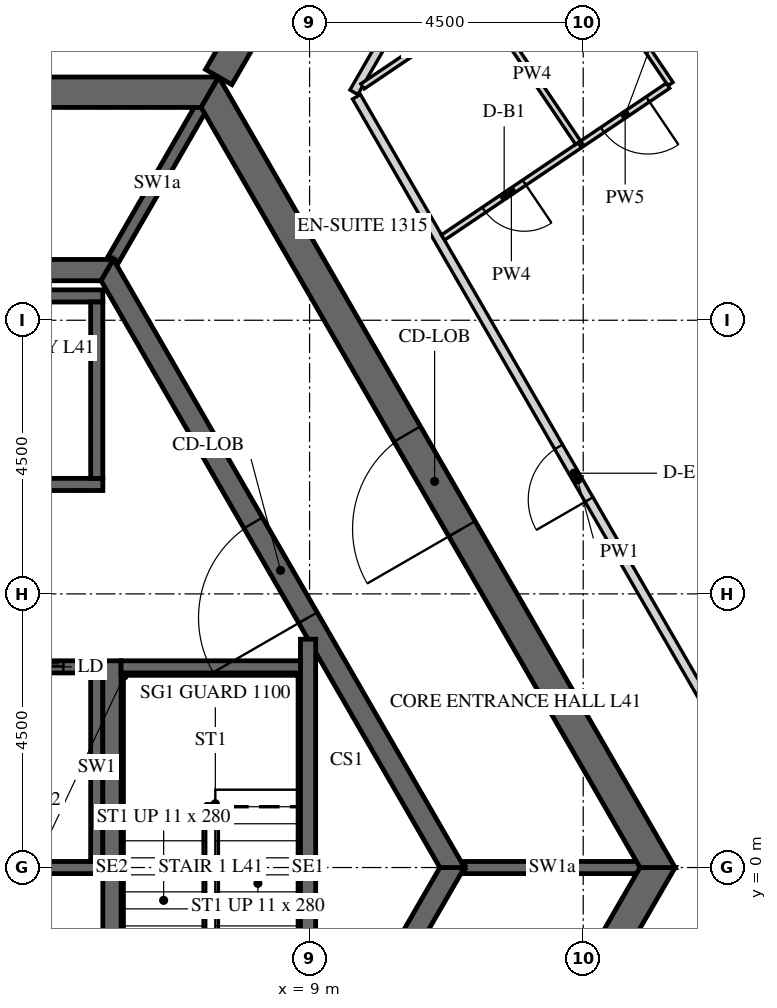
"""IFC4 building model, lengths in metres.
Left out: names, types, materials, properties, quantities, classifications, styles, units other than length and angle.
Written with IfcOpenShell. Run it as: python <this file> out.ifc"""

import sys

from ifc_helpers import new_model, si_unit, direction, frame, frame_2d, origin, place, context, subcontext, project, spatial, polyline, rectangle, outline, extrude, element, fill, save


model = new_model("IFC4")
c1 = context("Model", 3, precision=1e-05, world=origin(), true_north=direction((0.0, 1.0)))
c2 = subcontext(c1, "Body", "Model", "MODEL_VIEW")
j1 = project(units=[si_unit("LENGTHUNIT", "METRE"), si_unit("PLANEANGLEUNIT", "RADIAN")], contexts=[c1])
p1 = place(None, origin())
s1 = spatial("IfcSite", under=j1, at=p1, CompositionType="ELEMENT")
p2 = place(p1, origin())
s2 = spatial("IfcBuilding", under=s1, at=p2, CompositionType="ELEMENT")
p3 = place(p2, frame((0.0, 0.0, 176.1)))
s3 = spatial("IfcBuildingStorey", under=s2, at=p3, CompositionType="ELEMENT", Elevation=176.1)
p4 = place(p3, frame((7.361, -12.75, -0.15), z_axis=(0.0, 0.0, 1.0), x_axis=(0.50000571537, 0.866022103989, 0.0)))
e1 = element("IfcWall", 1, at=p4, inside=s3, PredefinedType="SHEAR", context=c2, shape_type="SweptSolid", body=[
    extrude(outline(polyline([(-0.144, -0.25), (14.867, -0.25), (14.578, 0.25), (0.144, 0.25), (-0.144, -0.25)])), origin(), (0.0, 0.0, 1.0), 3.9),
])
p5 = place(p4, frame((6.49, 0.0, 0.15)))
e2 = element("IfcOpeningElement", 2, at=p5, cuts=e1, PredefinedType="OPENING", context=c2, shape_type="SweptSolid", body=[
    extrude(rectangle(XDim=1.8, YDim=2.4, at=frame_2d((0.9, 1.2))), frame((0.0, 0.26, 0.0), z_axis=(0.0, -1.0, 0.0), x_axis=(1.0, 0.0, 0.0)), (0.0, 0.0, 1.0), 0.52),
])
p6 = place(p3, frame((14.722, 0.0, -0.15), z_axis=(0.0, 0.0, 1.0), x_axis=(-0.50000571537, 0.866022103989, 0.0)))
e3 = element("IfcWall", 3, at=p6, inside=s3, PredefinedType="SHEAR", context=c2, shape_type="SweptSolid", body=[
    extrude(outline(polyline([(-0.144, -0.25), (14.867, -0.25), (14.578, 0.25), (0.144, 0.25), (-0.144, -0.25)])), origin(), (0.0, 0.0, 1.0), 3.9),
])
p7 = place(p6, frame((6.432, 0.0, 0.15)))
e4 = element("IfcOpeningElement", 4, at=p7, cuts=e3, PredefinedType="OPENING", context=c2, shape_type="SweptSolid", body=[
    extrude(rectangle(XDim=1.8, YDim=2.4, at=frame_2d((0.9, 1.2))), frame((0.0, 0.26, 0.0), z_axis=(0.0, -1.0, 0.0), x_axis=(1.0, 0.0, 0.0)), (0.0, 0.0, 1.0), 0.52),
])
p8 = place(p3, frame((7.361, 12.75, -0.15), z_axis=(0.0, 0.0, 1.0), x_axis=(-1.0, 0.0, 0.0)))
e5 = element("IfcWall", 5, at=p8, inside=s3, PredefinedType="SHEAR", context=c2, shape_type="SweptSolid", body=[
    extrude(outline(polyline([(-0.144, -0.25), (14.866, -0.25), (14.578, 0.25), (0.144, 0.25), (-0.144, -0.25)])), origin(), (0.0, 0.0, 1.0), 3.9),
])
p9 = place(p8, frame((6.761, 0.0, 0.15)))
e6 = element("IfcOpeningElement", 6, at=p9, cuts=e5, PredefinedType="OPENING", context=c2, shape_type="SweptSolid", body=[
    extrude(rectangle(XDim=1.2, YDim=2.4, at=frame_2d((0.6, 1.2))), frame((0.0, 0.26, 0.0), z_axis=(0.0, -1.0, 0.0), x_axis=(1.0, 0.0, 0.0)), (0.0, 0.0, 1.0), 0.52),
])
p10 = place(p3, frame((7.506, 13.0, -0.15), z_axis=(0.0, 0.0, 1.0), x_axis=(0.499988271576, 0.866032175087, 0.0)))
e7 = element("IfcWall", 7, at=p10, inside=s3, PredefinedType="SHEAR", context=c2, shape_type="SweptSolid", body=[
    extrude(rectangle(XDim=15.424, YDim=0.5, at=frame_2d((7.712, 0.0))), origin(), (0.0, 0.0, 1.0), 3.9),
])
p11 = place(p10, frame((6.812, 0.0, 0.15)))
e8 = element("IfcOpeningElement", 8, at=p11, cuts=e7, PredefinedType="OPENING", context=c2, shape_type="SweptSolid", body=[
    extrude(rectangle(XDim=1.8, YDim=2.4, at=frame_2d((0.9, 1.2))), frame((0.0, 0.26, 0.0), z_axis=(0.0, -1.0, 0.0), x_axis=(1.0, 0.0, 0.0)), (0.0, 0.0, 1.0), 0.52),
])
p12 = place(p3, frame((5.673, -9.825, -0.15), z_axis=(0.0, 0.0, 1.0), x_axis=(0.499995046907, 0.866028263435, 0.0)))
e9 = element("IfcWall", 9, at=p12, inside=s3, PredefinedType="SHEAR", context=c2, shape_type="SweptSolid", body=[
    extrude(outline(polyline([(-0.101, -0.175), (11.446, -0.175), (11.244, 0.175), (0.101, 0.175), (-0.101, -0.175)])), origin(), (0.0, 0.0, 1.0), 3.9),
])
p13 = place(p12, frame((4.801, 0.0, 0.15)))
e10 = element("IfcOpeningElement", 10, at=p13, cuts=e9, PredefinedType="OPENING", context=c2, shape_type="SweptSolid", body=[
    extrude(rectangle(XDim=1.8, YDim=2.4, at=frame_2d((0.9, 1.2))), frame((0.0, 0.185, 0.0), z_axis=(0.0, -1.0, 0.0), x_axis=(1.0, 0.0, 0.0)), (0.0, 0.0, 1.0), 0.37),
])
p14 = place(p3, frame((11.345, 0.0, -0.15), z_axis=(0.0, 0.0, 1.0), x_axis=(-0.499995046907, 0.866028263435, 0.0)))
e11 = element("IfcWall", 11, at=p14, inside=s3, PredefinedType="SHEAR", context=c2, shape_type="SweptSolid", body=[
    extrude(outline(polyline([(-0.101, -0.175), (11.446, -0.175), (11.244, 0.175), (0.101, 0.175), (-0.101, -0.175)])), origin(), (0.0, 0.0, 1.0), 3.9),
])
p15 = place(p14, frame((4.744, 0.0, 0.15)))
e12 = element("IfcOpeningElement", 12, at=p15, cuts=e11, PredefinedType="OPENING", context=c2, shape_type="SweptSolid", body=[
    extrude(rectangle(XDim=1.8, YDim=2.4, at=frame_2d((0.9, 1.2))), frame((0.0, 0.185, 0.0), z_axis=(0.0, -1.0, 0.0), x_axis=(1.0, 0.0, 0.0)), (0.0, 0.0, 1.0), 0.37),
])
p16 = place(p3, frame((5.673, 9.825, -0.15), z_axis=(0.0, 0.0, 1.0), x_axis=(-1.0, 0.0, 0.0)))
e13 = element("IfcWall", 13, at=p16, inside=s3, PredefinedType="SHEAR", context=c2, shape_type="SweptSolid", body=[
    extrude(outline(polyline([(-0.101, -0.175), (11.446, -0.175), (11.244, 0.175), (0.101, 0.175), (-0.101, -0.175)])), origin(), (0.0, 0.0, 1.0), 3.9),
])
p17 = place(p3, frame((-5.6, 6.3, -0.25), z_axis=(0.0, 0.0, 1.0), x_axis=(1.0, 0.0, 0.0)))
e14 = element("IfcWall", 14, at=p17, inside=s3, PredefinedType="SHEAR", context=c2, shape_type="SweptSolid", body=[
    extrude(rectangle(XDim=11.2, YDim=0.2, at=frame_2d((5.6, 0.0))), origin(), (0.0, 0.0, 1.0), 3.9),
])
p18 = place(p17, frame((8.45, 0.0, 0.25)))
e15 = element("IfcOpeningElement", 15, at=p18, cuts=e14, PredefinedType="OPENING", context=c2, shape_type="SweptSolid", body=[
    extrude(rectangle(XDim=0.9, YDim=2.1, at=frame_2d((0.45, 1.05))), frame((0.0, 0.11, 0.0), z_axis=(0.0, -1.0, 0.0), x_axis=(1.0, 0.0, 0.0)), (0.0, 0.0, 1.0), 0.22),
])
p19 = place(p17, frame((0.65, 0.0, 0.25)))
e16 = element("IfcOpeningElement", 16, at=p19, cuts=e14, PredefinedType="OPENING", context=c2, shape_type="SweptSolid", body=[
    extrude(rectangle(XDim=1.1, YDim=2.1, at=frame_2d((0.55, 1.05))), frame((0.0, 0.11, 0.0), z_axis=(0.0, -1.0, 0.0), x_axis=(1.0, 0.0, 0.0)), (0.0, 0.0, 1.0), 0.22),
])
p20 = place(p17, frame((2.85, 0.0, 0.25)))
e17 = element("IfcOpeningElement", 17, at=p20, cuts=e14, PredefinedType="OPENING", context=c2, shape_type="SweptSolid", body=[
    extrude(rectangle(XDim=1.1, YDim=2.1, at=frame_2d((0.55, 1.05))), frame((0.0, 0.11, 0.0), z_axis=(0.0, -1.0, 0.0), x_axis=(1.0, 0.0, 0.0)), (0.0, 0.0, 1.0), 0.22),
])
p21 = place(p17, frame((5.05, 0.0, 0.25)))
e18 = element("IfcOpeningElement", 18, at=p21, cuts=e14, PredefinedType="OPENING", context=c2, shape_type="SweptSolid", body=[
    extrude(rectangle(XDim=1.1, YDim=2.1, at=frame_2d((0.55, 1.05))), frame((0.0, 0.11, 0.0), z_axis=(0.0, -1.0, 0.0), x_axis=(1.0, 0.0, 0.0)), (0.0, 0.0, 1.0), 0.22),
])
p22 = place(p3, frame((-5.6, 9.4, -0.25), z_axis=(0.0, 0.0, 1.0), x_axis=(1.0, 0.0, 0.0)))
e19 = element("IfcWall", 19, at=p22, inside=s3, PredefinedType="SHEAR", context=c2, shape_type="SweptSolid", body=[
    extrude(rectangle(XDim=11.2, YDim=0.2, at=frame_2d((5.6, 0.0))), origin(), (0.0, 0.0, 1.0), 3.9),
])
p23 = place(p3, frame((5.5, 6.4, -0.25), z_axis=(0.0, 0.0, 1.0), x_axis=(0.0, 1.0, 0.0)))
e20 = element("IfcWall", 20, at=p23, inside=s3, PredefinedType="SHEAR", context=c2, shape_type="SweptSolid", body=[
    extrude(rectangle(XDim=2.9, YDim=0.2, at=frame_2d((1.45, 0.0))), origin(), (0.0, 0.0, 1.0), 3.9),
])
p24 = place(p3, frame((-5.6, 3.3, -0.25), z_axis=(0.0, 0.0, 1.0), x_axis=(1.0, 0.0, 0.0)))
e21 = element("IfcWall", 21, at=p24, inside=s3, PredefinedType="SHEAR", context=c2, shape_type="SweptSolid", body=[
    extrude(rectangle(XDim=11.2, YDim=0.2, at=frame_2d((5.6, 0.0))), origin(), (0.0, 0.0, 1.0), 3.9),
])
p25 = place(p24, frame((0.65, 0.0, 0.25)))
e22 = element("IfcOpeningElement", 22, at=p25, cuts=e21, PredefinedType="OPENING", context=c2, shape_type="SweptSolid", body=[
    extrude(rectangle(XDim=1.1, YDim=2.1, at=frame_2d((0.55, 1.05))), frame((0.0, 0.11, 0.0), z_axis=(0.0, -1.0, 0.0), x_axis=(1.0, 0.0, 0.0)), (0.0, 0.0, 1.0), 0.22),
])
p26 = place(p24, frame((2.85, 0.0, 0.25)))
e23 = element("IfcOpeningElement", 23, at=p26, cuts=e21, PredefinedType="OPENING", context=c2, shape_type="SweptSolid", body=[
    extrude(rectangle(XDim=1.1, YDim=2.1, at=frame_2d((0.55, 1.05))), frame((0.0, 0.11, 0.0), z_axis=(0.0, -1.0, 0.0), x_axis=(1.0, 0.0, 0.0)), (0.0, 0.0, 1.0), 0.22),
])
p27 = place(p24, frame((5.05, 0.0, 0.25)))
e24 = element("IfcOpeningElement", 24, at=p27, cuts=e21, PredefinedType="OPENING", context=c2, shape_type="SweptSolid", body=[
    extrude(rectangle(XDim=1.1, YDim=2.1, at=frame_2d((0.55, 1.05))), frame((0.0, 0.11, 0.0), z_axis=(0.0, -1.0, 0.0), x_axis=(1.0, 0.0, 0.0)), (0.0, 0.0, 1.0), 0.22),
])
p28 = place(p24, frame((7.25, 0.0, 0.25)))
e25 = element("IfcOpeningElement", 25, at=p28, cuts=e21, PredefinedType="OPENING", context=c2, shape_type="SweptSolid", body=[
    extrude(rectangle(XDim=1.1, YDim=2.1, at=frame_2d((0.55, 1.05))), frame((0.0, 0.11, 0.0), z_axis=(0.0, -1.0, 0.0), x_axis=(1.0, 0.0, 0.0)), (0.0, 0.0, 1.0), 0.22),
])
p29 = place(p24, frame((9.45, 0.0, 0.25)))
e26 = element("IfcOpeningElement", 26, at=p29, cuts=e21, PredefinedType="OPENING", context=c2, shape_type="SweptSolid", body=[
    extrude(rectangle(XDim=1.1, YDim=2.1, at=frame_2d((0.55, 1.05))), frame((0.0, 0.11, 0.0), z_axis=(0.0, -1.0, 0.0), x_axis=(1.0, 0.0, 0.0)), (0.0, 0.0, 1.0), 0.22),
])
p30 = place(p3, frame((-5.6, 0.0, -0.25), z_axis=(0.0, 0.0, 1.0), x_axis=(1.0, 0.0, 0.0)))
e27 = element("IfcWall", 27, at=p30, inside=s3, PredefinedType="SHEAR", context=c2, shape_type="SweptSolid", body=[
    extrude(rectangle(XDim=11.2, YDim=0.2, at=frame_2d((5.6, 0.0))), origin(), (0.0, 0.0, 1.0), 3.9),
])
p31 = place(p3, frame((5.5, 0.1, -0.25), z_axis=(0.0, 0.0, 1.0), x_axis=(0.0, 1.0, 0.0)))
e28 = element("IfcWall", 28, at=p31, inside=s3, PredefinedType="SHEAR", context=c2, shape_type="SweptSolid", body=[
    extrude(rectangle(XDim=3.1, YDim=0.2, at=frame_2d((1.55, 0.0))), origin(), (0.0, 0.0, 1.0), 3.9),
])
for number, where, z_axis, x_axis in (
    (29, (11.547, 0.0, -0.15), (0.0, 0.0, 1.0), (1.0, 0.0, 0.0)),
    (30, (5.773, 10.0, -0.15), (0.0, 0.0, 1.0), (0.5, 0.866, 0.0)),
):
    element("IfcWall", number, at=place(p3, frame(where, z_axis=z_axis, x_axis=x_axis)), inside=s3, PredefinedType="SHEAR", context=c2, shape_type="SweptSolid", body=[
        extrude(rectangle(XDim=2.887, YDim=0.2, at=frame_2d((1.443, 0.0))), origin(), (0.0, 0.0, 1.0), 3.9),
    ])
p32 = place(p3, frame((5.75, -3.4, -0.25), z_axis=(0.0, 0.0, 1.0), x_axis=(0.0, 1.0, 0.0)))
e31 = element("IfcWall", 31, at=p32, inside=s3, PredefinedType="SHEAR", context=c2, shape_type="SweptSolid", body=[
    extrude(rectangle(XDim=6.8, YDim=0.3, at=frame_2d((3.4, 0.0))), origin(), (0.0, 0.0, 1.0), 3.9),
])
p33 = place(p3, frame((8.975, -3.755, -0.25), z_axis=(0.0, 0.0, 1.0), x_axis=(0.0, 1.0, 0.0)))
e32 = element("IfcWall", 32, at=p33, inside=s3, PredefinedType="SHEAR", context=c2, shape_type="SweptSolid", body=[
    extrude(rectangle(XDim=7.51, YDim=0.25, at=frame_2d((3.755, 0.0))), origin(), (0.0, 0.0, 1.0), 3.9),
])
p34 = place(p3, frame((5.9, 3.3, -0.25), z_axis=(0.0, 0.0, 1.0), x_axis=(1.0, 0.0, 0.0)))
e33 = element("IfcWall", 33, at=p34, inside=s3, PredefinedType="SHEAR", context=c2, shape_type="SweptSolid", body=[
    extrude(rectangle(XDim=2.95, YDim=0.2, at=frame_2d((1.475, 0.0))), origin(), (0.0, 0.0, 1.0), 3.9),
])
p35 = place(p3, frame((10.714, -11.043, 0.0), z_axis=(0.0, 0.0, 1.0), x_axis=(0.500001980452, 0.866024260367, 0.0)))
e34 = element("IfcWall", 34, at=p35, inside=s3, PredefinedType="PARTITIONING", context=c2, shape_type="SweptSolid", body=[
    extrude(rectangle(XDim=12.752, YDim=0.15, at=frame_2d((6.376, 0.0))), origin(), (0.0, 0.0, 1.0), 2.988),
])
p36 = place(p35, frame((6.125, 0.0, 0.0)))
e35 = element("IfcOpeningElement", 35, at=p36, cuts=e34, PredefinedType="OPENING", context=c2, shape_type="SweptSolid", body=[
    extrude(rectangle(XDim=1.0, YDim=2.1, at=frame_2d((0.5, 1.05))), frame((0.0, 0.085, 0.0), z_axis=(0.0, -1.0, 0.0), x_axis=(1.0, 0.0, 0.0)), (0.0, 0.0, 1.0), 0.17),
])
p37 = place(p35, frame((11.602, 0.0, 0.0)))
e36 = element("IfcOpeningElement", 36, at=p37, cuts=e34, PredefinedType="OPENING", context=c2, shape_type="SweptSolid", body=[
    extrude(rectangle(XDim=1.0, YDim=2.1, at=frame_2d((0.5, 1.05))), frame((0.0, 0.085, 0.0), z_axis=(0.0, -1.0, 0.0), x_axis=(1.0, 0.0, 0.0)), (0.0, 0.0, 1.0), 0.17),
])
p38 = place(p3, frame((17.046, 0.075, 0.0), z_axis=(0.0, 0.0, 1.0), x_axis=(-0.499999403554, 0.866025748143, 0.0)))
e37 = element("IfcWall", 37, at=p38, inside=s3, PredefinedType="PARTITIONING", context=c2, shape_type="SweptSolid", body=[
    extrude(rectangle(XDim=14.549, YDim=0.15, at=frame_2d((7.275, 0.0))), origin(), (0.0, 0.0, 1.0), 2.988),
])
p39 = place(p38, frame((6.901, 0.0, 0.0)))
e38 = element("IfcOpeningElement", 38, at=p39, cuts=e37, PredefinedType="OPENING", context=c2, shape_type="SweptSolid", body=[
    extrude(rectangle(XDim=1.0, YDim=2.1, at=frame_2d((0.5, 1.05))), frame((0.0, 0.085, 0.0), z_axis=(0.0, -1.0, 0.0), x_axis=(1.0, 0.0, 0.0)), (0.0, 0.0, 1.0), 0.17),
])
p40 = place(p3, frame((9.728, 12.75, 0.0), z_axis=(0.0, 0.0, 1.0), x_axis=(0.500007149838, 0.866021275784, 0.0)))
e39 = element("IfcWall", 39, at=p40, inside=s3, PredefinedType="PARTITIONING", context=c2, shape_type="SweptSolid", body=[
    extrude(rectangle(XDim=8.017, YDim=0.15, at=frame_2d((4.009, 0.0))), origin(), (0.0, 0.0, 1.0), 2.988),
])
p41 = place(p3, frame((9.87, 12.846, 0.0), z_axis=(0.0, 0.0, 1.0), x_axis=(0.829044958406, 0.559181953341, 0.0)))
e40 = element("IfcWall", 40, at=p41, inside=s3, PredefinedType="PARTITIONING", context=c2, shape_type="SweptSolid", body=[
    extrude(rectangle(XDim=2.422, YDim=0.1, at=frame_2d((1.211, 0.0))), origin(), (0.0, 0.0, 1.0), 2.988),
])
p42 = place(p3, frame((13.444, 11.878, 0.0), z_axis=(0.0, 0.0, 1.0), x_axis=(-0.829076008986, -0.559135914894, 0.0)))
e41 = element("IfcWall", 41, at=p42, inside=s3, PredefinedType="PARTITIONING", context=c2, shape_type="SweptSolid", body=[
    extrude(rectangle(XDim=2.713, YDim=0.1, at=frame_2d((1.357, 0.0))), origin(), (0.0, 0.0, 1.0), 2.988),
])
p43 = place(p42, frame((1.1, 0.0, 0.0)))
e42 = element("IfcOpeningElement", 42, at=p43, cuts=e41, PredefinedType="OPENING", context=c2, shape_type="SweptSolid", body=[
    extrude(rectangle(XDim=0.8, YDim=2.1, at=frame_2d((0.4, 1.05))), frame((0.0, 0.06, 0.0), z_axis=(0.0, -1.0, 0.0), x_axis=(1.0, 0.0, 0.0)), (0.0, 0.0, 1.0), 0.12),
])
p44 = place(p3, frame((13.398, 15.165, 0.0), z_axis=(0.0, 0.0, 1.0), x_axis=(0.559178562802, -0.829047245278, 0.0)))
e43 = element("IfcWall", 43, at=p44, inside=s3, PredefinedType="PARTITIONING", context=c2, shape_type="SweptSolid", body=[
    extrude(rectangle(XDim=2.75, YDim=0.1, at=frame_2d((1.375, 0.0))), origin(), (0.0, 0.0, 1.0), 2.988),
])
p45 = place(p3, frame((14.894, 12.857, 0.0), z_axis=(0.0, 0.0, 1.0), x_axis=(-0.828988508894, -0.559265636457, 0.0)))
e44 = element("IfcWall", 44, at=p45, inside=s3, PredefinedType="PARTITIONING", context=c2, shape_type="SweptSolid", body=[
    extrude(rectangle(XDim=1.7, YDim=0.1, at=frame_2d((0.85, 0.0))), origin(), (0.0, 0.0, 1.0), 2.988),
])
p46 = place(p45, frame((0.4, 0.0, 0.0)))
e45 = element("IfcOpeningElement", 45, at=p46, cuts=e44, PredefinedType="OPENING", context=c2, shape_type="SweptSolid", body=[
    extrude(rectangle(XDim=0.9, YDim=2.1, at=frame_2d((0.45, 1.05))), frame((0.0, 0.06, 0.0), z_axis=(0.0, -1.0, 0.0), x_axis=(1.0, 0.0, 0.0)), (0.0, 0.0, 1.0), 0.12),
])
p47 = place(p3, frame((13.416, 11.92, 0.0), z_axis=(0.0, 0.0, 1.0), x_axis=(-0.559157567313, 0.829061405999, 0.0)))
e46 = element("IfcWall", 46, at=p47, inside=s3, PredefinedType="PARTITIONING", context=c2, shape_type="SweptSolid", body=[
    extrude(rectangle(XDim=2.7, YDim=0.1, at=frame_2d((1.35, 0.0))), origin(), (0.0, 0.0, 1.0), 2.988),
])
p48 = place(p7, origin())
e47 = element("IfcDoor", 47, at=p48, inside=s3, OperationType="DOUBLE_DOOR_SINGLE_SWING", PredefinedType="DOOR", context=c2, shape_type="SweptSolid", body=[
    extrude(rectangle(XDim=1.8, YDim=2.4, at=frame_2d((0.9, 1.2))), frame((0.0, 0.025, 0.0), z_axis=(0.0, -1.0, 0.0), x_axis=(1.0, 0.0, 0.0)), (0.0, 0.0, 1.0), 0.05),
])
fill(e4, e47)
p49 = place(p15, origin())
e48 = element("IfcDoor", 48, at=p49, inside=s3, OperationType="DOUBLE_DOOR_SINGLE_SWING", PredefinedType="DOOR", context=c2, shape_type="SweptSolid", body=[
    extrude(rectangle(XDim=1.8, YDim=2.4, at=frame_2d((0.9, 1.2))), frame((0.0, 0.025, 0.0), z_axis=(0.0, -1.0, 0.0), x_axis=(1.0, 0.0, 0.0)), (0.0, 0.0, 1.0), 0.05),
])
fill(e12, e48)
p50 = place(p29, origin())
e49 = element("IfcDoor", 49, at=p50, inside=s3, OperationType="SLIDING_TO_LEFT", PredefinedType="DOOR", context=c2, shape_type="SweptSolid", body=[
    extrude(rectangle(XDim=1.1, YDim=2.1, at=frame_2d((0.55, 1.05))), frame((0.0, 0.025, 0.0), z_axis=(0.0, -1.0, 0.0), x_axis=(1.0, 0.0, 0.0)), (0.0, 0.0, 1.0), 0.05),
])
fill(e26, e49)
p51 = place(p39, origin())
e50 = element("IfcDoor", 50, at=p51, inside=s3, OperationType="SINGLE_SWING_RIGHT", PredefinedType="DOOR", context=c2, shape_type="SweptSolid", body=[
    extrude(rectangle(XDim=1.0, YDim=2.1, at=frame_2d((0.5, 1.05))), frame((0.0, 0.025, 0.0), z_axis=(0.0, -1.0, 0.0), x_axis=(1.0, 0.0, 0.0)), (0.0, 0.0, 1.0), 0.05),
])
fill(e38, e50)
p52 = place(p43, origin())
e51 = element("IfcDoor", 51, at=p52, inside=s3, OperationType="SINGLE_SWING_LEFT", PredefinedType="DOOR", context=c2, shape_type="SweptSolid", body=[
    extrude(rectangle(XDim=0.8, YDim=2.1, at=frame_2d((0.4, 1.05))), frame((0.0, 0.025, 0.0), z_axis=(0.0, -1.0, 0.0), x_axis=(1.0, 0.0, 0.0)), (0.0, 0.0, 1.0), 0.05),
])
fill(e42, e51)
p53 = place(p46, origin())
e52 = element("IfcDoor", 52, at=p53, inside=s3, OperationType="SINGLE_SWING_RIGHT", PredefinedType="DOOR", context=c2, shape_type="SweptSolid", body=[
    extrude(rectangle(XDim=0.9, YDim=2.1, at=frame_2d((0.45, 1.05))), frame((0.0, 0.025, 0.0), z_axis=(0.0, -1.0, 0.0), x_axis=(1.0, 0.0, 0.0)), (0.0, 0.0, 1.0), 0.05),
])
fill(e45, e52)
save(model, sys.argv[1])
